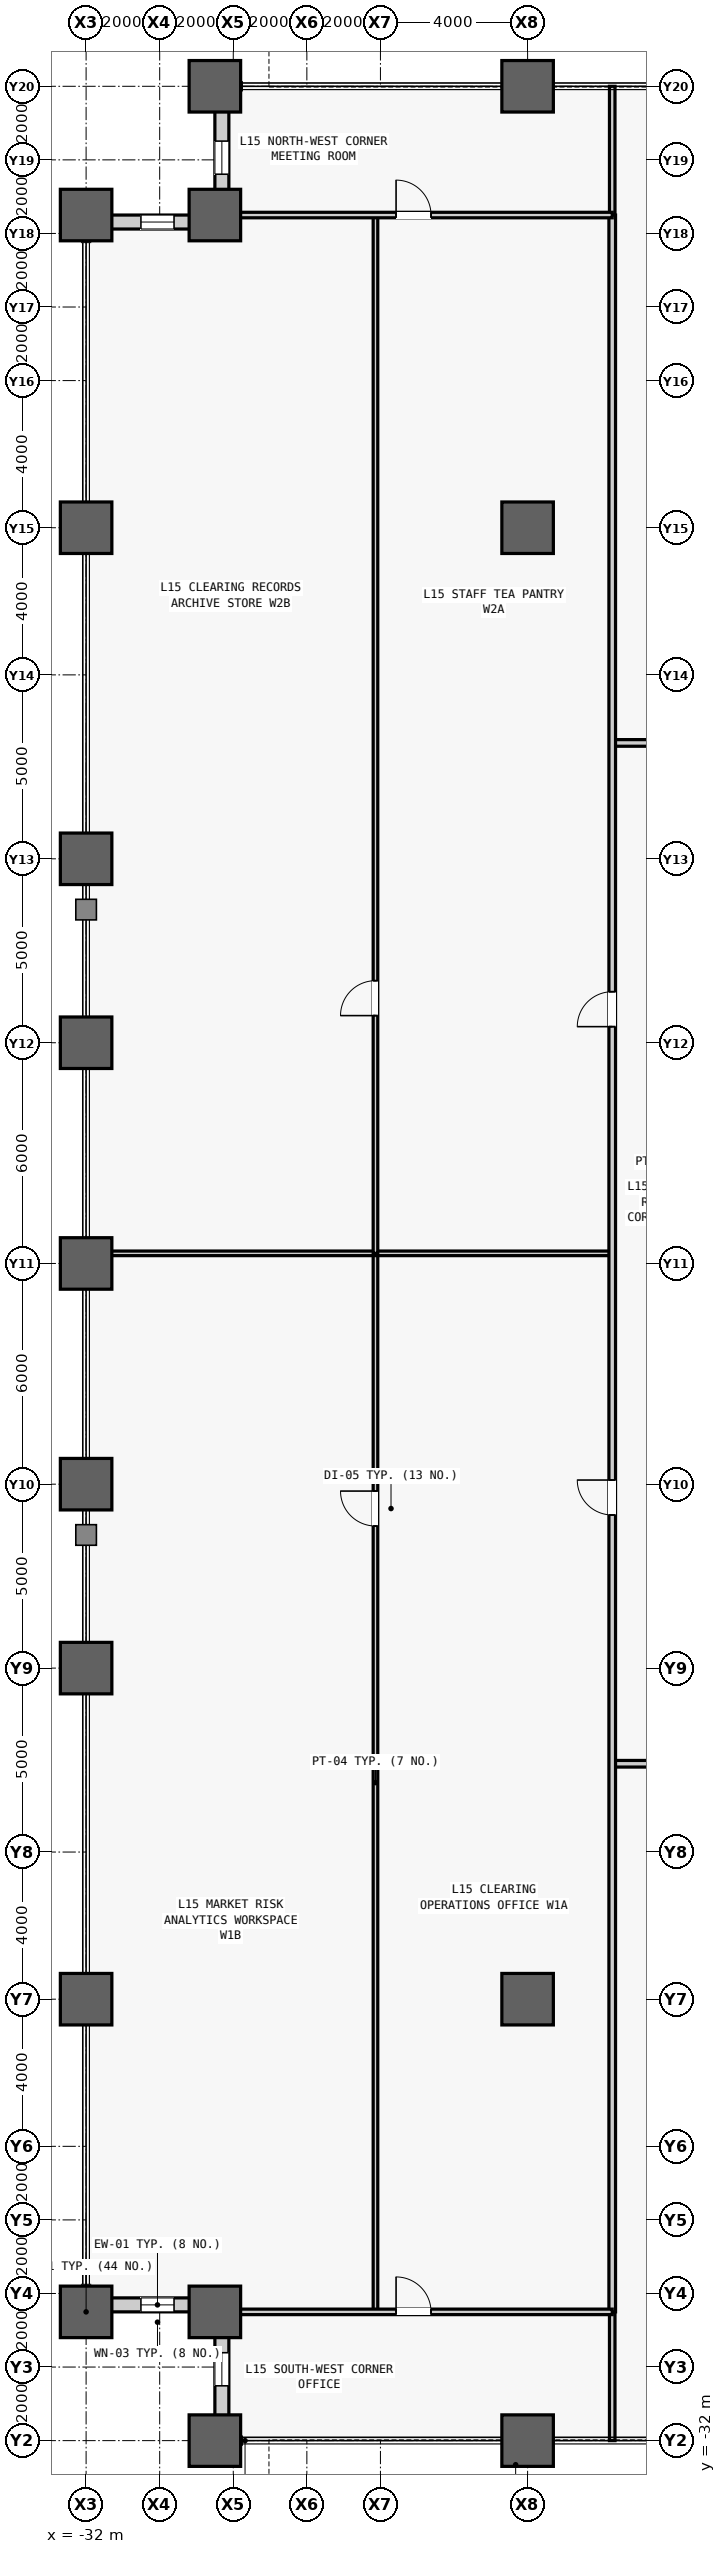
"""IFC4 building model, lengths in metres.
Left out: names, types, materials, properties, quantities, classifications, styles, units other than length and angle.
Written with IfcOpenShell. Run it as: python <this file> out.ifc"""

import sys

from ifc_helpers import new_model, si_unit, direction, frame, frame_2d, origin, origin_2d, place, context, subcontext, project, spatial, rectangle, hollow_rectangle, extrude, source, transform, mapped, element, fill, save


model = new_model("IFC4")
c1 = context("Model", 3, precision=1e-05, world=origin(), true_north=direction((0.0, 1.0)))
c2 = subcontext(c1, "Body", "Model", "MODEL_VIEW")
j1 = project(units=[si_unit("LENGTHUNIT", "METRE"), si_unit("PLANEANGLEUNIT", "RADIAN")], contexts=[c1])
p1 = place(None, origin())
s1 = spatial("IfcSite", under=j1, at=p1, CompositionType="ELEMENT")
p2 = place(p1, origin())
s2 = spatial("IfcBuilding", under=s1, at=p2, CompositionType="ELEMENT")
p3 = place(p2, frame((0.0, 0.0, 70.4)))
s3 = spatial("IfcBuildingStorey", under=s2, at=p3, CompositionType="ELEMENT", Elevation=70.4)
m1 = source(origin(), c2, "Body", "SweptSolid", [
    extrude(hollow_rectangle(XDim=1.4, YDim=1.4, WallThickness=0.075, at=origin_2d()), origin(), (0.0, 0.0, 1.0), 4.2),
])
for number, where, z_axis, x_axis in (
    (1, (-32.0, -28.5, 0.0), (0.0, 0.0, 1.0), (1.0, 0.0, 0.0)),
    (2, (-32.0, -20.0, 0.0), (0.0, 0.0, 1.0), (1.0, 0.0, 0.0)),
    (3, (-32.0, -11.0, 0.0), (0.0, 0.0, 1.0), (1.0, 0.0, 0.0)),
    (4, (-32.0, -6.0, 0.0), (0.0, 0.0, 1.0), (1.0, 0.0, 0.0)),
    (5, (-32.0, 0.0, 0.0), (0.0, 0.0, 1.0), (1.0, 0.0, 0.0)),
    (6, (-32.0, 6.0, 0.0), (0.0, 0.0, 1.0), (1.0, 0.0, 0.0)),
    (7, (-32.0, 11.0, 0.0), (0.0, 0.0, 1.0), (1.0, 0.0, 0.0)),
    (8, (-32.0, 20.0, 0.0), (0.0, 0.0, 1.0), (1.0, 0.0, 0.0)),
    (9, (-32.0, 28.5, 0.0), (0.0, 0.0, 1.0), (1.0, 0.0, 0.0)),
    (10, (-28.5, -32.0, 0.0), (0.0, 0.0, 1.0), (1.0, 0.0, 0.0)),
    (11, (-28.5, -28.5, 0.0), (0.0, 0.0, 1.0), (1.0, 0.0, 0.0)),
    (12, (-28.5, 28.5, 0.0), (0.0, 0.0, 1.0), (1.0, 0.0, 0.0)),
    (13, (-28.5, 32.0, 0.0), (0.0, 0.0, 1.0), (1.0, 0.0, 0.0)),
    (14, (-20.0, -32.0, 0.0), (0.0, 0.0, 1.0), (1.0, 0.0, 0.0)),
    (15, (-20.0, -20.0, 0.0), (0.0, 0.0, 1.0), (1.0, 0.0, 0.0)),
    (16, (-20.0, 20.0, 0.0), (0.0, 0.0, 1.0), (1.0, 0.0, 0.0)),
    (17, (-20.0, 32.0, 0.0), (0.0, 0.0, 1.0), (1.0, 0.0, 0.0)),
):
    element("IfcColumn", number, at=place(p3, frame(where, z_axis=z_axis, x_axis=x_axis)), inside=s3, PredefinedType="COLUMN", context=c2, shape_type="MappedRepresentation", body=[
        mapped(m1, transform((0.0, 0.0, 0.0), scale=1.0)),
    ])
m2 = source(origin(), c2, "Body", "SweptSolid", [
    extrude(rectangle(XDim=3.12, YDim=0.38, at=frame_2d((1.56, 0.0))), origin(), (0.0, 0.0, 1.0), 3.245),
])
p4 = place(p3, frame((-28.5, -28.31, 0.0), z_axis=(0.0, 0.0, 1.0), x_axis=(-1.0, 0.0, 0.0)))
e18 = element("IfcWall", 18, at=p4, inside=s3, PredefinedType="STANDARD", context=c2, shape_type="MappedRepresentation", body=[
    mapped(m2, transform((0.0, 0.0, 0.0), scale=1.0)),
])
m3 = source(origin(), c2, "Body", "SweptSolid", [
    extrude(rectangle(XDim=0.9, YDim=2.4, at=frame_2d((0.45, 1.2))), frame((0.0, 0.2, 0.0), z_axis=(0.0, -1.0, 0.0), x_axis=(1.0, 0.0, 0.0)), (0.0, 0.0, 1.0), 0.4),
])
p5 = place(p4, frame((1.11, 0.0, 0.5)))
e19 = element("IfcOpeningElement", 19, at=p5, cuts=e18, PredefinedType="OPENING", context=c2, shape_type="MappedRepresentation", body=[
    mapped(m3, transform((0.0, 0.0, 0.0), scale=1.0)),
])
p6 = place(p3, frame((-28.31, -31.62, 0.0), z_axis=(0.0, 0.0, 1.0), x_axis=(0.0, 1.0, 0.0)))
e20 = element("IfcWall", 20, at=p6, inside=s3, PredefinedType="STANDARD", context=c2, shape_type="MappedRepresentation", body=[
    mapped(m2, transform((0.0, 0.0, 0.0), scale=1.0)),
])
p7 = place(p6, frame((1.11, 0.0, 0.5)))
e21 = element("IfcOpeningElement", 21, at=p7, cuts=e20, PredefinedType="OPENING", context=c2, shape_type="MappedRepresentation", body=[
    mapped(m3, transform((0.0, 0.0, 0.0), scale=1.0)),
])
p8 = place(p3, frame((-28.31, 28.5, 0.0), z_axis=(0.0, 0.0, 1.0), x_axis=(0.0, 1.0, 0.0)))
e22 = element("IfcWall", 22, at=p8, inside=s3, PredefinedType="STANDARD", context=c2, shape_type="MappedRepresentation", body=[
    mapped(m2, transform((0.0, 0.0, 0.0), scale=1.0)),
])
p9 = place(p8, frame((1.11, 0.0, 0.5)))
e23 = element("IfcOpeningElement", 23, at=p9, cuts=e22, PredefinedType="OPENING", context=c2, shape_type="MappedRepresentation", body=[
    mapped(m3, transform((0.0, 0.0, 0.0), scale=1.0)),
])
p10 = place(p3, frame((-28.5, 28.31, 0.0), z_axis=(0.0, 0.0, 1.0), x_axis=(-1.0, 0.0, 0.0)))
e24 = element("IfcWall", 24, at=p10, inside=s3, PredefinedType="STANDARD", context=c2, shape_type="MappedRepresentation", body=[
    mapped(m2, transform((0.0, 0.0, 0.0), scale=1.0)),
])
p11 = place(p10, frame((1.11, 0.0, 0.5)))
e25 = element("IfcOpeningElement", 25, at=p11, cuts=e24, PredefinedType="OPENING", context=c2, shape_type="MappedRepresentation", body=[
    mapped(m3, transform((0.0, 0.0, 0.0), scale=1.0)),
])
m4 = source(origin(), c2, "Body", "SweptSolid", [
    extrude(rectangle(XDim=36.25, YDim=0.18, at=frame_2d((18.125, 0.0))), origin(), (0.0, 0.0, 1.0), 3.94),
])
p12 = place(p3, frame((-17.7, -13.6, 0.0), z_axis=(0.0, 0.0, 1.0), x_axis=(1.0, 0.0, 0.0)))
e26 = element("IfcWall", 26, at=p12, inside=s3, PredefinedType="PARTITIONING", context=c2, shape_type="MappedRepresentation", body=[
    mapped(m4, transform((0.0, 0.0, 0.0), scale=1.0)),
])
m5 = source(origin(), c2, "Body", "SweptSolid", [
    extrude(rectangle(XDim=1.05, YDim=2.2, at=frame_2d((0.525, 1.1))), frame((0.0, 0.1, 0.0), z_axis=(0.0, -1.0, 0.0), x_axis=(1.0, 0.0, 0.0)), (0.0, 0.0, 1.0), 0.2),
])
p13 = place(p12, frame((10.55, 0.0, 0.0)))
e27 = element("IfcOpeningElement", 27, at=p13, cuts=e26, PredefinedType="OPENING", context=c2, shape_type="MappedRepresentation", body=[
    mapped(m5, transform((0.0, 0.0, 0.0), scale=1.0)),
])
p14 = place(p12, frame((24.95, 0.0, 0.0)))
e28 = element("IfcOpeningElement", 28, at=p14, cuts=e26, PredefinedType="OPENING", context=c2, shape_type="MappedRepresentation", body=[
    mapped(m5, transform((0.0, 0.0, 0.0), scale=1.0)),
])
p15 = place(p3, frame((-17.7, 14.15, 0.0), z_axis=(0.0, 0.0, 1.0), x_axis=(1.0, 0.0, 0.0)))
e29 = element("IfcWall", 29, at=p15, inside=s3, PredefinedType="PARTITIONING", context=c2, shape_type="MappedRepresentation", body=[
    mapped(m4, transform((0.0, 0.0, 0.0), scale=1.0)),
])
p16 = place(p15, frame((6.562, 0.0, 0.0)))
e30 = element("IfcOpeningElement", 30, at=p16, cuts=e29, PredefinedType="OPENING", context=c2, shape_type="MappedRepresentation", body=[
    mapped(m5, transform((0.0, 0.0, 0.0), scale=1.0)),
])
p17 = place(p15, frame((16.694, 0.0, 0.0)))
e31 = element("IfcOpeningElement", 31, at=p17, cuts=e29, PredefinedType="OPENING", context=c2, shape_type="MappedRepresentation", body=[
    mapped(m5, transform((0.0, 0.0, 0.0), scale=1.0)),
])
p18 = place(p15, frame((27.306, 0.0, 0.0)))
e32 = element("IfcOpeningElement", 32, at=p18, cuts=e29, PredefinedType="OPENING", context=c2, shape_type="MappedRepresentation", body=[
    mapped(m5, transform((0.0, 0.0, 0.0), scale=1.0)),
])
m6 = source(origin(), c2, "Body", "SweptSolid", [
    extrude(rectangle(XDim=3.5, YDim=0.15, at=frame_2d((1.75, 0.0))), origin(), (0.0, 0.0, 1.0), 3.94),
])
for number, where, z_axis, x_axis in (
    (33, (-17.7, -32.0, 0.0), (0.0, 0.0, 1.0), (0.0, 1.0, 0.0)),
    (34, (-17.7, 28.5, 0.0), (0.0, 0.0, 1.0), (0.0, 1.0, 0.0)),
):
    element("IfcWall", number, at=place(p3, frame(where, z_axis=z_axis, x_axis=x_axis)), inside=s3, PredefinedType="PARTITIONING", context=c2, shape_type="MappedRepresentation", body=[
        mapped(m6, transform((0.0, 0.0, 0.0), scale=1.0)),
    ])
m7 = source(origin(), c2, "Body", "SweptSolid", [
    extrude(rectangle(XDim=28.775, YDim=0.125, at=frame_2d((14.387, 0.0))), origin(), (0.0, 0.0, 1.0), 3.94),
])
p19 = place(p3, frame((-24.135, -28.5, 0.0), z_axis=(0.0, 0.0, 1.0), x_axis=(0.0, 1.0, 0.0)))
e35 = element("IfcWall", 35, at=p19, inside=s3, PredefinedType="PARTITIONING", context=c2, shape_type="MappedRepresentation", body=[
    mapped(m7, transform((0.0, 0.0, 0.0), scale=1.0)),
])
m8 = source(origin(), c2, "Body", "SweptSolid", [
    extrude(rectangle(XDim=0.95, YDim=2.15, at=frame_2d((0.475, 1.075))), frame((0.0, 0.073, 0.0), z_axis=(0.0, -1.0, 0.0), x_axis=(1.0, 0.0, 0.0)), (0.0, 0.0, 1.0), 0.145),
])
p20 = place(p19, frame((21.363, 0.0, 0.0)))
e36 = element("IfcOpeningElement", 36, at=p20, cuts=e35, PredefinedType="OPENING", context=c2, shape_type="MappedRepresentation", body=[
    mapped(m8, transform((0.0, 0.0, 0.0), scale=1.0)),
])
m9 = source(origin(), c2, "Body", "SweptSolid", [
    extrude(rectangle(XDim=14.3, YDim=0.125, at=frame_2d((7.15, 0.0))), origin(), (0.0, 0.0, 1.0), 3.085),
])
p21 = place(p3, frame((-32.0, 0.275, 0.0), z_axis=(0.0, 0.0, 1.0), x_axis=(1.0, 0.0, 0.0)))
e37 = element("IfcWall", 37, at=p21, inside=s3, PredefinedType="PARTITIONING", context=c2, shape_type="MappedRepresentation", body=[
    mapped(m9, transform((0.0, 0.0, 0.0), scale=1.0)),
])
m10 = source(origin(), c2, "Body", "SweptSolid", [
    extrude(rectangle(XDim=28.225, YDim=0.125, at=frame_2d((14.113, 0.0))), origin(), (0.0, 0.0, 1.0), 3.94),
])
p22 = place(p3, frame((-24.135, 0.275, 0.0), z_axis=(0.0, 0.0, 1.0), x_axis=(0.0, 1.0, 0.0)))
e38 = element("IfcWall", 38, at=p22, inside=s3, PredefinedType="PARTITIONING", context=c2, shape_type="MappedRepresentation", body=[
    mapped(m10, transform((0.0, 0.0, 0.0), scale=1.0)),
])
p23 = place(p22, frame((6.462, 0.0, 0.0)))
e39 = element("IfcOpeningElement", 39, at=p23, cuts=e38, PredefinedType="OPENING", context=c2, shape_type="MappedRepresentation", body=[
    mapped(m8, transform((0.0, 0.0, 0.0), scale=1.0)),
])
m11 = source(origin(), c2, "Body", "SweptSolid", [
    extrude(rectangle(XDim=57.0, YDim=0.18, at=frame_2d((28.5, 0.0))), origin(), (0.0, 0.0, 1.0), 3.94),
])
p24 = place(p3, frame((-17.7, -28.5, 0.0), z_axis=(0.0, 0.0, 1.0), x_axis=(0.0, 1.0, 0.0)))
e40 = element("IfcWall", 40, at=p24, inside=s3, PredefinedType="PARTITIONING", context=c2, shape_type="MappedRepresentation", body=[
    mapped(m11, transform((0.0, 0.0, 0.0), scale=1.0)),
])
m12 = source(origin(), c2, "Body", "SweptSolid", [
    extrude(rectangle(XDim=0.95, YDim=2.15, at=frame_2d((0.475, 1.075))), frame((0.0, 0.1, 0.0), z_axis=(0.0, -1.0, 0.0), x_axis=(1.0, 0.0, 0.0)), (0.0, 0.0, 1.0), 0.2),
])
p25 = place(p24, frame((21.663, 0.0, 0.0)))
e41 = element("IfcOpeningElement", 41, at=p25, cuts=e40, PredefinedType="OPENING", context=c2, shape_type="MappedRepresentation", body=[
    mapped(m12, transform((0.0, 0.0, 0.0), scale=1.0)),
])
p26 = place(p24, frame((34.938, 0.0, 0.0)))
e42 = element("IfcOpeningElement", 42, at=p26, cuts=e40, PredefinedType="OPENING", context=c2, shape_type="MappedRepresentation", body=[
    mapped(m12, transform((0.0, 0.0, 0.0), scale=1.0)),
])
m13 = source(origin(), c2, "Body", "SweptSolid", [
    extrude(rectangle(XDim=10.8, YDim=0.15, at=frame_2d((5.4, 0.0))), origin(), (0.0, 0.0, 1.0), 3.94),
])
p27 = place(p3, frame((-28.5, -28.5, 0.0), z_axis=(0.0, 0.0, 1.0), x_axis=(1.0, 0.0, 0.0)))
e43 = element("IfcWall", 43, at=p27, inside=s3, PredefinedType="PARTITIONING", context=c2, shape_type="MappedRepresentation", body=[
    mapped(m13, transform((0.0, 0.0, 0.0), scale=1.0)),
])
m14 = source(origin(), c2, "Body", "SweptSolid", [
    extrude(rectangle(XDim=0.95, YDim=2.15, at=frame_2d((0.475, 1.075))), frame((0.0, 0.085, 0.0), z_axis=(0.0, -1.0, 0.0), x_axis=(1.0, 0.0, 0.0)), (0.0, 0.0, 1.0), 0.17),
])
p28 = place(p27, frame((4.925, 0.0, 0.0)))
e44 = element("IfcOpeningElement", 44, at=p28, cuts=e43, PredefinedType="OPENING", context=c2, shape_type="MappedRepresentation", body=[
    mapped(m14, transform((0.0, 0.0, 0.0), scale=1.0)),
])
p29 = place(p3, frame((-28.5, 28.5, 0.0), z_axis=(0.0, 0.0, 1.0), x_axis=(1.0, 0.0, 0.0)))
e45 = element("IfcWall", 45, at=p29, inside=s3, PredefinedType="PARTITIONING", context=c2, shape_type="MappedRepresentation", body=[
    mapped(m13, transform((0.0, 0.0, 0.0), scale=1.0)),
])
p30 = place(p29, frame((4.925, 0.0, 0.0)))
e46 = element("IfcOpeningElement", 46, at=p30, cuts=e45, PredefinedType="OPENING", context=c2, shape_type="MappedRepresentation", body=[
    mapped(m14, transform((0.0, 0.0, 0.0), scale=1.0)),
])
m15 = source(origin(), c2, "Body", "SweptSolid", [
    extrude(rectangle(XDim=0.9, YDim=2.4, at=frame_2d((0.45, 1.2))), frame((0.0, 0.03, 0.0), z_axis=(0.0, -1.0, 0.0), x_axis=(1.0, 0.0, 0.0)), (0.0, 0.0, 1.0), 0.06),
])
p31 = place(p5, origin())
e47 = element("IfcWindow", 47, at=p31, inside=s3, PartitioningType="SINGLE_PANEL", PredefinedType="WINDOW", context=c2, shape_type="MappedRepresentation", body=[
    mapped(m15, transform((0.0, 0.0, 0.0), scale=1.0)),
])
fill(e19, e47)
p32 = place(p7, origin())
e48 = element("IfcWindow", 48, at=p32, inside=s3, PartitioningType="SINGLE_PANEL", PredefinedType="WINDOW", context=c2, shape_type="MappedRepresentation", body=[
    mapped(m15, transform((0.0, 0.0, 0.0), scale=1.0)),
])
fill(e21, e48)
p33 = place(p9, origin())
e49 = element("IfcWindow", 49, at=p33, inside=s3, PartitioningType="SINGLE_PANEL", PredefinedType="WINDOW", context=c2, shape_type="MappedRepresentation", body=[
    mapped(m15, transform((0.0, 0.0, 0.0), scale=1.0)),
])
fill(e23, e49)
p34 = place(p11, origin())
e50 = element("IfcWindow", 50, at=p34, inside=s3, PartitioningType="SINGLE_PANEL", PredefinedType="WINDOW", context=c2, shape_type="MappedRepresentation", body=[
    mapped(m15, transform((0.0, 0.0, 0.0), scale=1.0)),
])
fill(e25, e50)
m16 = source(origin(), c2, "Body", "SweptSolid", [
    extrude(rectangle(XDim=0.95, YDim=2.15, at=frame_2d((0.475, 1.075))), frame((0.0, 0.025, 0.0), z_axis=(0.0, -1.0, 0.0), x_axis=(1.0, 0.0, 0.0)), (0.0, 0.0, 1.0), 0.05),
])
p35 = place(p20, origin())
e51 = element("IfcDoor", 51, at=p35, inside=s3, OperationType="SINGLE_SWING_RIGHT", PredefinedType="DOOR", context=c2, shape_type="MappedRepresentation", body=[
    mapped(m16, transform((0.0, 0.0, 0.0), scale=1.0)),
])
fill(e36, e51)
p36 = place(p23, origin())
e52 = element("IfcDoor", 52, at=p36, inside=s3, OperationType="SINGLE_SWING_LEFT", PredefinedType="DOOR", context=c2, shape_type="MappedRepresentation", body=[
    mapped(m16, transform((0.0, 0.0, 0.0), scale=1.0)),
])
fill(e39, e52)
p37 = place(p25, origin())
e53 = element("IfcDoor", 53, at=p37, inside=s3, OperationType="SINGLE_SWING_RIGHT", PredefinedType="DOOR", context=c2, shape_type="MappedRepresentation", body=[
    mapped(m16, transform((0.0, 0.0, 0.0), scale=1.0)),
])
fill(e41, e53)
p38 = place(p26, origin())
e54 = element("IfcDoor", 54, at=p38, inside=s3, OperationType="SINGLE_SWING_LEFT", PredefinedType="DOOR", context=c2, shape_type="MappedRepresentation", body=[
    mapped(m16, transform((0.0, 0.0, 0.0), scale=1.0)),
])
fill(e42, e54)
p39 = place(p28, origin())
e55 = element("IfcDoor", 55, at=p39, inside=s3, OperationType="SINGLE_SWING_LEFT", PredefinedType="DOOR", context=c2, shape_type="MappedRepresentation", body=[
    mapped(m16, transform((0.0, 0.0, 0.0), scale=1.0)),
])
fill(e44, e55)
p40 = place(p30, origin())
e56 = element("IfcDoor", 56, at=p40, inside=s3, OperationType="SINGLE_SWING_LEFT", PredefinedType="DOOR", context=c2, shape_type="MappedRepresentation", body=[
    mapped(m16, transform((0.0, 0.0, 0.0), scale=1.0)),
])
fill(e46, e56)
save(model, sys.argv[1])
